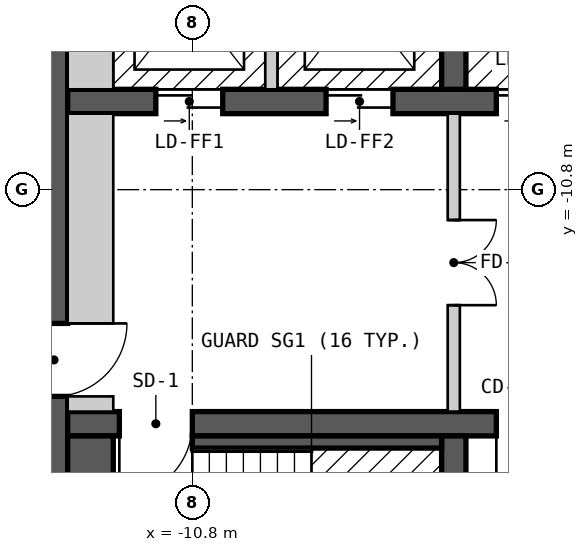
"""IFC4 building model, lengths in metres.
Left out: names, types, materials, properties, quantities, classifications, styles, units other than length and angle.
Written with IfcOpenShell. Run it as: python <this file> out.ifc"""

import sys

from ifc_helpers import new_model, si_unit, direction, frame, frame_2d, origin, place, context, subcontext, project, spatial, rectangle, extrude, element, fill, save


model = new_model("IFC4")
c1 = context("Model", 3, precision=1e-05, world=origin(), true_north=direction((0.0, 1.0)))
c2 = subcontext(c1, "Body", "Model", "MODEL_VIEW")
j1 = project(units=[si_unit("LENGTHUNIT", "METRE"), si_unit("PLANEANGLEUNIT", "RADIAN")], contexts=[c1])
p1 = place(None, origin())
s1 = spatial("IfcSite", under=j1, at=p1, CompositionType="ELEMENT")
p2 = place(p1, origin())
s2 = spatial("IfcBuilding", under=s1, at=p2, CompositionType="ELEMENT")
p3 = place(p2, frame((0.0, 0.0, 202.8)))
s3 = spatial("IfcBuildingStorey", under=s2, at=p3, CompositionType="ELEMENT", Elevation=202.8)
p4 = place(p3, frame((-13.075, -18.55, 0.0), z_axis=(0.0, 0.0, 1.0), x_axis=(0.0, 1.0, 0.0)))
e1 = element("IfcWall", 1, at=p4, inside=s3, PredefinedType="SHEAR", context=c2, shape_type="SweptSolid", body=[
    extrude(rectangle(XDim=13.1, YDim=0.45, at=frame_2d((6.55, 0.0))), origin(), (0.0, 0.0, 1.0), 2.7),
])
p5 = place(p4, frame((4.35, 0.0, 0.0)))
e2 = element("IfcOpeningElement", 2, at=p5, cuts=e1, PredefinedType="OPENING", context=c2, shape_type="SweptSolid", body=[
    extrude(rectangle(XDim=1.2, YDim=2.1, at=frame_2d((0.6, 1.05))), frame((0.0, 0.235, 0.0), z_axis=(0.0, -1.0, 0.0), x_axis=(1.0, 0.0, 0.0)), (0.0, 0.0, 1.0), 0.47),
])
p6 = place(p3, frame((-12.85, -14.65, 0.0), z_axis=(0.0, 0.0, 1.0), x_axis=(1.0, 0.0, 0.0)))
e3 = element("IfcWall", 3, at=p6, inside=s3, PredefinedType="SHEAR", context=c2, shape_type="SweptSolid", body=[
    extrude(rectangle(XDim=25.7, YDim=0.4, at=frame_2d((12.85, 0.0))), origin(), (0.0, 0.0, 1.0), 2.7),
])
p7 = place(p6, frame((2.05, 0.0, 0.0), z_axis=(0.0, 0.0, 1.0), x_axis=(-1.0, 0.0, 0.0)))
e4 = element("IfcOpeningElement", 4, at=p7, cuts=e3, PredefinedType="OPENING", context=c2, shape_type="SweptSolid", body=[
    extrude(rectangle(XDim=1.2, YDim=2.1, at=frame_2d((0.6, 1.05))), frame((0.0, 0.21, 0.0), z_axis=(0.0, -1.0, 0.0), x_axis=(1.0, 0.0, 0.0)), (0.0, 0.0, 1.0), 0.42),
])
p8 = place(p6, frame((24.9, 0.0, 0.0), z_axis=(0.0, 0.0, 1.0), x_axis=(-1.0, 0.0, 0.0)))
e5 = element("IfcOpeningElement", 5, at=p8, cuts=e3, PredefinedType="OPENING", context=c2, shape_type="SweptSolid", body=[
    extrude(rectangle(XDim=1.2, YDim=2.1, at=frame_2d((0.6, 1.05))), frame((0.0, 0.21, 0.0), z_axis=(0.0, -1.0, 0.0), x_axis=(1.0, 0.0, 0.0)), (0.0, 0.0, 1.0), 0.42),
])
p9 = place(p6, frame((7.95, 0.0, 0.0), z_axis=(0.0, 0.0, 1.0), x_axis=(-1.0, 0.0, 0.0)))
e6 = element("IfcOpeningElement", 6, at=p9, cuts=e3, PredefinedType="OPENING", context=c2, shape_type="SweptSolid", body=[
    extrude(rectangle(XDim=0.9, YDim=2.1, at=frame_2d((0.45, 1.05))), frame((0.0, 0.21, 0.0), z_axis=(0.0, -1.0, 0.0), x_axis=(1.0, 0.0, 0.0)), (0.0, 0.0, 1.0), 0.42),
])
p10 = place(p6, frame((10.0, 0.0, 0.0), z_axis=(0.0, 0.0, 1.0), x_axis=(-1.0, 0.0, 0.0)))
e7 = element("IfcOpeningElement", 7, at=p10, cuts=e3, PredefinedType="OPENING", context=c2, shape_type="SweptSolid", body=[
    extrude(rectangle(XDim=0.9, YDim=2.1, at=frame_2d((0.45, 1.05))), frame((0.0, 0.21, 0.0), z_axis=(0.0, -1.0, 0.0), x_axis=(1.0, 0.0, 0.0)), (0.0, 0.0, 1.0), 0.42),
])
p11 = place(p6, frame((12.3, 0.0, 0.0), z_axis=(0.0, 0.0, 1.0), x_axis=(-1.0, 0.0, 0.0)))
e8 = element("IfcOpeningElement", 8, at=p11, cuts=e3, PredefinedType="OPENING", context=c2, shape_type="SweptSolid", body=[
    extrude(rectangle(XDim=1.0, YDim=2.1, at=frame_2d((0.5, 1.05))), frame((0.0, 0.21, 0.0), z_axis=(0.0, -1.0, 0.0), x_axis=(1.0, 0.0, 0.0)), (0.0, 0.0, 1.0), 0.42),
])
p12 = place(p6, frame((14.5, 0.0, 0.0), z_axis=(0.0, 0.0, 1.0), x_axis=(-1.0, 0.0, 0.0)))
e9 = element("IfcOpeningElement", 9, at=p12, cuts=e3, PredefinedType="OPENING", context=c2, shape_type="SweptSolid", body=[
    extrude(rectangle(XDim=0.9, YDim=2.1, at=frame_2d((0.45, 1.05))), frame((0.0, 0.21, 0.0), z_axis=(0.0, -1.0, 0.0), x_axis=(1.0, 0.0, 0.0)), (0.0, 0.0, 1.0), 0.42),
])
p13 = place(p6, frame((16.5, 0.0, 0.0), z_axis=(0.0, 0.0, 1.0), x_axis=(-1.0, 0.0, 0.0)))
e10 = element("IfcOpeningElement", 10, at=p13, cuts=e3, PredefinedType="OPENING", context=c2, shape_type="SweptSolid", body=[
    extrude(rectangle(XDim=0.9, YDim=2.1, at=frame_2d((0.45, 1.05))), frame((0.0, 0.21, 0.0), z_axis=(0.0, -1.0, 0.0), x_axis=(1.0, 0.0, 0.0)), (0.0, 0.0, 1.0), 0.42),
])
p14 = place(p6, frame((18.65, 0.0, 0.0), z_axis=(0.0, 0.0, 1.0), x_axis=(-1.0, 0.0, 0.0)))
e11 = element("IfcOpeningElement", 11, at=p14, cuts=e3, PredefinedType="OPENING", context=c2, shape_type="SweptSolid", body=[
    extrude(rectangle(XDim=1.0, YDim=2.1, at=frame_2d((0.5, 1.05))), frame((0.0, 0.21, 0.0), z_axis=(0.0, -1.0, 0.0), x_axis=(1.0, 0.0, 0.0)), (0.0, 0.0, 1.0), 0.42),
])
p15 = place(p3, frame((-12.85, -9.35, 0.0), z_axis=(0.0, 0.0, 1.0), x_axis=(1.0, 0.0, 0.0)))
e12 = element("IfcWall", 12, at=p15, inside=s3, PredefinedType="SHEAR", context=c2, shape_type="SweptSolid", body=[
    extrude(rectangle(XDim=23.05, YDim=0.4, at=frame_2d((11.525, 0.0))), origin(), (0.0, 0.0, 1.0), 2.7),
])
p16 = place(p15, frame((1.45, 0.0, 0.0)))
e13 = element("IfcOpeningElement", 13, at=p16, cuts=e12, PredefinedType="OPENING", context=c2, shape_type="SweptSolid", body=[
    extrude(rectangle(XDim=1.1, YDim=2.1, at=frame_2d((0.55, 1.05))), frame((0.0, 0.21, 0.0), z_axis=(0.0, -1.0, 0.0), x_axis=(1.0, 0.0, 0.0)), (0.0, 0.0, 1.0), 0.42),
])
p17 = place(p15, frame((4.25, 0.0, 0.0)))
e14 = element("IfcOpeningElement", 14, at=p17, cuts=e12, PredefinedType="OPENING", context=c2, shape_type="SweptSolid", body=[
    extrude(rectangle(XDim=1.1, YDim=2.1, at=frame_2d((0.55, 1.05))), frame((0.0, 0.21, 0.0), z_axis=(0.0, -1.0, 0.0), x_axis=(1.0, 0.0, 0.0)), (0.0, 0.0, 1.0), 0.42),
])
p18 = place(p15, frame((7.05, 0.0, 0.0)))
e15 = element("IfcOpeningElement", 15, at=p18, cuts=e12, PredefinedType="OPENING", context=c2, shape_type="SweptSolid", body=[
    extrude(rectangle(XDim=1.1, YDim=2.1, at=frame_2d((0.55, 1.05))), frame((0.0, 0.21, 0.0), z_axis=(0.0, -1.0, 0.0), x_axis=(1.0, 0.0, 0.0)), (0.0, 0.0, 1.0), 0.42),
])
p19 = place(p15, frame((9.35, 0.0, 0.0)))
e16 = element("IfcOpeningElement", 16, at=p19, cuts=e12, PredefinedType="OPENING", context=c2, shape_type="SweptSolid", body=[
    extrude(rectangle(XDim=1.1, YDim=2.1, at=frame_2d((0.55, 1.05))), frame((0.0, 0.21, 0.0), z_axis=(0.0, -1.0, 0.0), x_axis=(1.0, 0.0, 0.0)), (0.0, 0.0, 1.0), 0.42),
])
p20 = place(p15, frame((11.65, 0.0, 0.0)))
e17 = element("IfcOpeningElement", 17, at=p20, cuts=e12, PredefinedType="OPENING", context=c2, shape_type="SweptSolid", body=[
    extrude(rectangle(XDim=1.1, YDim=2.1, at=frame_2d((0.55, 1.05))), frame((0.0, 0.21, 0.0), z_axis=(0.0, -1.0, 0.0), x_axis=(1.0, 0.0, 0.0)), (0.0, 0.0, 1.0), 0.42),
])
p21 = place(p15, frame((13.95, 0.0, 0.0)))
e18 = element("IfcOpeningElement", 18, at=p21, cuts=e12, PredefinedType="OPENING", context=c2, shape_type="SweptSolid", body=[
    extrude(rectangle(XDim=1.1, YDim=2.1, at=frame_2d((0.55, 1.05))), frame((0.0, 0.21, 0.0), z_axis=(0.0, -1.0, 0.0), x_axis=(1.0, 0.0, 0.0)), (0.0, 0.0, 1.0), 0.42),
])
p22 = place(p15, frame((16.25, 0.0, 0.0)))
e19 = element("IfcOpeningElement", 19, at=p22, cuts=e12, PredefinedType="OPENING", context=c2, shape_type="SweptSolid", body=[
    extrude(rectangle(XDim=1.1, YDim=2.1, at=frame_2d((0.55, 1.05))), frame((0.0, 0.21, 0.0), z_axis=(0.0, -1.0, 0.0), x_axis=(1.0, 0.0, 0.0)), (0.0, 0.0, 1.0), 0.42),
])
p23 = place(p15, frame((18.55, 0.0, 0.0)))
e20 = element("IfcOpeningElement", 20, at=p23, cuts=e12, PredefinedType="OPENING", context=c2, shape_type="SweptSolid", body=[
    extrude(rectangle(XDim=1.1, YDim=2.1, at=frame_2d((0.55, 1.05))), frame((0.0, 0.21, 0.0), z_axis=(0.0, -1.0, 0.0), x_axis=(1.0, 0.0, 0.0)), (0.0, 0.0, 1.0), 0.42),
])
p24 = place(p15, frame((20.95, 0.0, 0.0)))
e21 = element("IfcOpeningElement", 21, at=p24, cuts=e12, PredefinedType="OPENING", context=c2, shape_type="SweptSolid", body=[
    extrude(rectangle(XDim=1.1, YDim=2.1, at=frame_2d((0.55, 1.05))), frame((0.0, 0.21, 0.0), z_axis=(0.0, -1.0, 0.0), x_axis=(1.0, 0.0, 0.0)), (0.0, 0.0, 1.0), 0.42),
])
for number, where, z_axis, x_axis in (
    (22, (-6.5, -18.55, 0.0), (0.0, 0.0, 1.0), (0.0, 1.0, 0.0)),
    (23, (-6.5, -9.15, 0.0), (0.0, 0.0, 1.0), (0.0, 1.0, 0.0)),
):
    element("IfcWall", number, at=place(p3, frame(where, z_axis=z_axis, x_axis=x_axis)), inside=s3, PredefinedType="SHEAR", context=c2, shape_type="SweptSolid", body=[
        extrude(rectangle(XDim=3.7, YDim=0.4, at=frame_2d((1.85, 0.0))), origin(), (0.0, 0.0, 1.0), 2.7),
    ])
p25 = place(p3, frame((-12.475, -18.55, 0.0), z_axis=(0.0, 0.0, 1.0), x_axis=(0.0, 1.0, 0.0)))
e24 = element("IfcWall", 24, at=p25, inside=s3, PredefinedType="SOLIDWALL", context=c2, shape_type="SweptSolid", body=[
    extrude(rectangle(XDim=3.7, YDim=0.75, at=frame_2d((1.85, 0.0))), origin(), (0.0, 0.0, 1.0), 2.7),
])
p26 = place(p3, frame((-12.85, -14.325, 0.0), z_axis=(0.0, 0.0, 1.0), x_axis=(1.0, 0.0, 0.0)))
e25 = element("IfcWall", 25, at=p26, inside=s3, PredefinedType="PARTITIONING", context=c2, shape_type="SweptSolid", body=[
    extrude(rectangle(XDim=0.75, YDim=0.25, at=frame_2d((0.375, 0.0))), origin(), (0.0, 0.0, 1.0), 2.7),
])
p27 = place(p3, frame((-12.475, -13.0, 0.0), z_axis=(0.0, 0.0, 1.0), x_axis=(0.0, 1.0, 0.0)))
e26 = element("IfcWall", 26, at=p27, inside=s3, PredefinedType="PARTITIONING", context=c2, shape_type="SweptSolid", body=[
    extrude(rectangle(XDim=3.45, YDim=0.75, at=frame_2d((1.725, 0.0))), origin(), (0.0, 0.0, 1.0), 2.7),
])
p28 = place(p3, frame((-12.475, -9.15, 0.0), z_axis=(0.0, 0.0, 1.0), x_axis=(0.0, 1.0, 0.0)))
e27 = element("IfcWall", 27, at=p28, inside=s3, PredefinedType="SOLIDWALL", context=c2, shape_type="SweptSolid", body=[
    extrude(rectangle(XDim=3.7, YDim=0.75, at=frame_2d((1.85, 0.0))), origin(), (0.0, 0.0, 1.0), 2.7),
])
p29 = place(p3, frame((-10.8, -14.95, 0.0), z_axis=(0.0, 0.0, 1.0), x_axis=(1.0, 0.0, 0.0)))
e28 = element("IfcWall", 28, at=p29, inside=s3, PredefinedType="SOLIDWALL", context=c2, shape_type="SweptSolid", body=[
    extrude(rectangle(XDim=4.1, YDim=0.2, at=frame_2d((2.05, 0.0))), origin(), (0.0, 0.0, 1.0), 2.7),
])
p30 = place(p3, frame((-9.5, -9.15, 0.0), z_axis=(0.0, 0.0, 1.0), x_axis=(0.0, 1.0, 0.0)))
e29 = element("IfcWall", 29, at=p30, inside=s3, PredefinedType="SOLIDWALL", context=c2, shape_type="SweptSolid", body=[
    extrude(rectangle(XDim=2.95, YDim=0.2, at=frame_2d((1.475, 0.0))), origin(), (0.0, 0.0, 1.0), 2.7),
])
p31 = place(p3, frame((-6.5, -14.45, 0.0), z_axis=(0.0, 0.0, 1.0), x_axis=(0.0, 1.0, 0.0)))
e30 = element("IfcWall", 30, at=p31, inside=s3, PredefinedType="PARTITIONING", context=c2, shape_type="SweptSolid", body=[
    extrude(rectangle(XDim=4.9, YDim=0.2, at=frame_2d((2.45, 0.0))), origin(), (0.0, 0.0, 1.0), 2.7),
])
p32 = place(p31, frame((3.15, 0.0, 0.0), z_axis=(0.0, 0.0, 1.0), x_axis=(-1.0, 0.0, 0.0)))
e31 = element("IfcOpeningElement", 31, at=p32, cuts=e30, PredefinedType="OPENING", context=c2, shape_type="SweptSolid", body=[
    extrude(rectangle(XDim=1.4, YDim=2.1, at=frame_2d((0.7, 1.05))), frame((0.0, 0.11, 0.0), z_axis=(0.0, -1.0, 0.0), x_axis=(1.0, 0.0, 0.0)), (0.0, 0.0, 1.0), 0.22),
])
p33 = place(p16, origin())
e32 = element("IfcDoor", 32, at=p33, inside=s3, OperationType="DOUBLE_DOOR_SLIDING", PredefinedType="DOOR", context=c2, shape_type="SweptSolid", body=[
    extrude(rectangle(XDim=1.1, YDim=2.1, at=frame_2d((0.55, 1.05))), frame((0.0, 0.025, 0.0), z_axis=(0.0, -1.0, 0.0), x_axis=(1.0, 0.0, 0.0)), (0.0, 0.0, 1.0), 0.05),
])
fill(e13, e32)
p34 = place(p17, origin())
e33 = element("IfcDoor", 33, at=p34, inside=s3, OperationType="DOUBLE_DOOR_SLIDING", PredefinedType="DOOR", context=c2, shape_type="SweptSolid", body=[
    extrude(rectangle(XDim=1.1, YDim=2.1, at=frame_2d((0.55, 1.05))), frame((0.0, 0.025, 0.0), z_axis=(0.0, -1.0, 0.0), x_axis=(1.0, 0.0, 0.0)), (0.0, 0.0, 1.0), 0.05),
])
fill(e14, e33)
p35 = place(p18, origin())
e34 = element("IfcDoor", 34, at=p35, inside=s3, OperationType="DOUBLE_DOOR_SLIDING", PredefinedType="DOOR", context=c2, shape_type="SweptSolid", body=[
    extrude(rectangle(XDim=1.1, YDim=2.1, at=frame_2d((0.55, 1.05))), frame((0.0, 0.025, 0.0), z_axis=(0.0, -1.0, 0.0), x_axis=(1.0, 0.0, 0.0)), (0.0, 0.0, 1.0), 0.05),
])
fill(e15, e34)
p36 = place(p7, origin())
e35 = element("IfcDoor", 35, at=p36, inside=s3, OperationType="SINGLE_SWING_RIGHT", PredefinedType="DOOR", context=c2, shape_type="SweptSolid", body=[
    extrude(rectangle(XDim=1.2, YDim=2.1, at=frame_2d((0.6, 1.05))), frame((0.0, 0.025, 0.0), z_axis=(0.0, -1.0, 0.0), x_axis=(1.0, 0.0, 0.0)), (0.0, 0.0, 1.0), 0.05),
])
fill(e4, e35)
p37 = place(p5, origin())
e36 = element("IfcDoor", 36, at=p37, inside=s3, OperationType="SINGLE_SWING_RIGHT", PredefinedType="DOOR", context=c2, shape_type="SweptSolid", body=[
    extrude(rectangle(XDim=1.2, YDim=2.1, at=frame_2d((0.6, 1.05))), frame((0.0, 0.025, 0.0), z_axis=(0.0, -1.0, 0.0), x_axis=(1.0, 0.0, 0.0)), (0.0, 0.0, 1.0), 0.05),
])
fill(e2, e36)
p38 = place(p32, origin())
e37 = element("IfcDoor", 37, at=p38, inside=s3, OperationType="DOUBLE_DOOR_SINGLE_SWING", PredefinedType="DOOR", context=c2, shape_type="SweptSolid", body=[
    extrude(rectangle(XDim=1.4, YDim=2.1, at=frame_2d((0.7, 1.05))), frame((0.0, 0.025, 0.0), z_axis=(0.0, -1.0, 0.0), x_axis=(1.0, 0.0, 0.0)), (0.0, 0.0, 1.0), 0.05),
])
fill(e31, e37)
p39 = place(p9, origin())
e38 = element("IfcDoor", 38, at=p39, inside=s3, OperationType="SINGLE_SWING_RIGHT", PredefinedType="DOOR", context=c2, shape_type="SweptSolid", body=[
    extrude(rectangle(XDim=0.9, YDim=2.1, at=frame_2d((0.45, 1.05))), frame((0.0, 0.025, 0.0), z_axis=(0.0, -1.0, 0.0), x_axis=(1.0, 0.0, 0.0)), (0.0, 0.0, 1.0), 0.05),
])
fill(e6, e38)
save(model, sys.argv[1])
